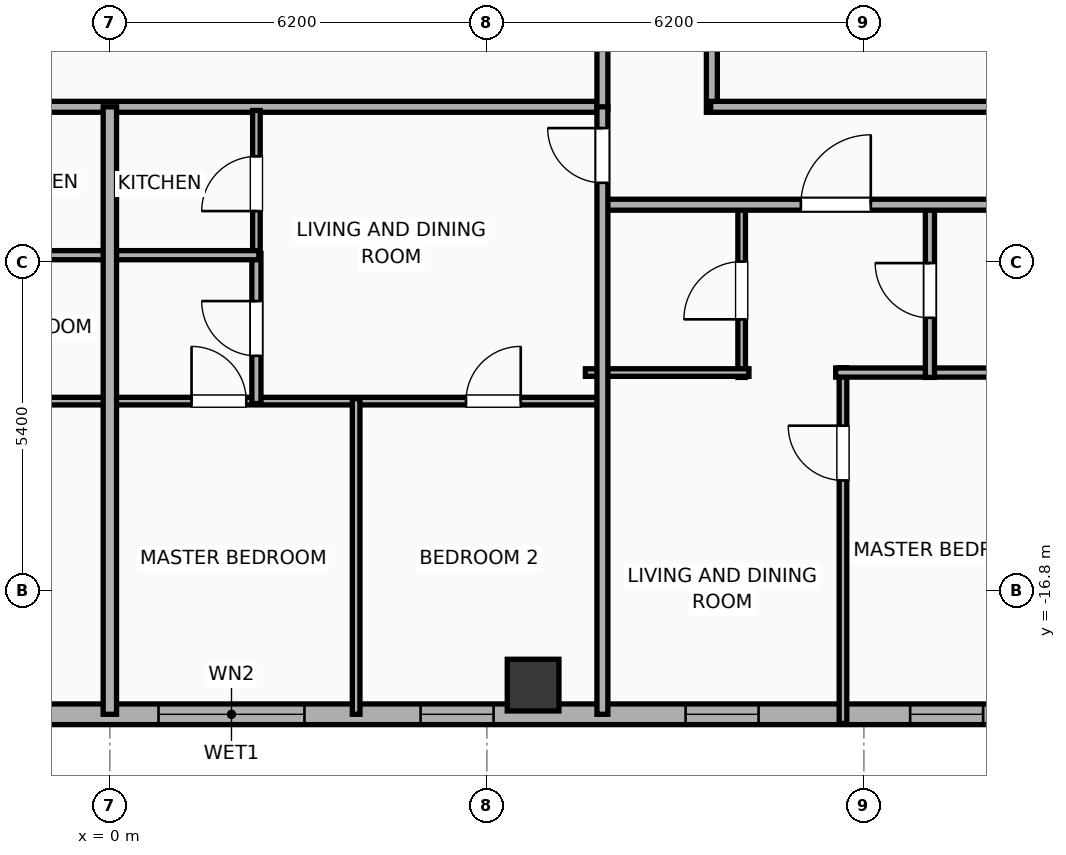
"""IFC4 building model, lengths in metres.
Left out: names, types, materials, properties, quantities, classifications, styles, units other than length and angle.
Written with IfcOpenShell. Run it as: python <this file> out.ifc"""

import sys

from ifc_helpers import new_model, si_unit, direction, frame, frame_2d, origin, origin_2d, place, context, subcontext, project, spatial, rectangle, hollow_rectangle, extrude, element, fill, save


model = new_model("IFC4")
c1 = context("Model", 3, precision=1e-05, world=origin(), true_north=direction((0.0, 1.0)))
c2 = subcontext(c1, "Body", "Model", "MODEL_VIEW")
j1 = project(units=[si_unit("LENGTHUNIT", "METRE"), si_unit("PLANEANGLEUNIT", "RADIAN")], contexts=[c1])
p1 = place(None, origin())
s1 = spatial("IfcSite", under=j1, at=p1, CompositionType="ELEMENT")
p2 = place(p1, origin())
s2 = spatial("IfcBuilding", under=s1, at=p2, CompositionType="ELEMENT")
p3 = place(p2, frame((0.0, 0.0, 250.9)))
s3 = spatial("IfcBuildingStorey", under=s2, at=p3, CompositionType="ELEMENT", Elevation=250.9)
p4 = place(p3, frame((6.96, -18.35, 0.0), z_axis=(0.0, 0.0, 1.0), x_axis=(1.0, 0.0, 0.0)))
e1 = element("IfcColumn", 1, at=p4, inside=s3, PredefinedType="COLUMN", context=c2, shape_type="SweptSolid", body=[
    extrude(hollow_rectangle(XDim=0.85, YDim=0.85, WallThickness=0.028, at=origin_2d()), origin(), (0.0, 0.0, 1.0), 3.865),
])
p5 = place(p3, frame((26.783, -18.83, 0.0), z_axis=(0.0, 0.0, 1.0), x_axis=(-1.0, 0.0, 0.0)))
e2 = element("IfcWall", 2, at=p5, inside=s3, PredefinedType="ELEMENTEDWALL", context=c2, shape_type="SweptSolid", body=[
    extrude(rectangle(XDim=49.566, YDim=0.34, at=frame_2d((24.783, 0.0))), origin(), (0.0, 0.0, 1.0), 2.39),
])
p6 = place(p5, frame((23.583, 0.0, 0.75)))
e3 = element("IfcOpeningElement", 3, at=p6, cuts=e2, PredefinedType="OPENING", context=c2, shape_type="SweptSolid", body=[
    extrude(rectangle(XDim=2.4, YDim=1.45, at=frame_2d((1.2, 0.725))), frame((0.0, 0.18, 0.0), z_axis=(0.0, -1.0, 0.0), x_axis=(1.0, 0.0, 0.0)), (0.0, 0.0, 1.0), 0.36),
])
p7 = place(p5, frame((41.756, 0.0, 0.75)))
e4 = element("IfcOpeningElement", 4, at=p7, cuts=e2, PredefinedType="OPENING", context=c2, shape_type="SweptSolid", body=[
    extrude(rectangle(XDim=2.4, YDim=1.45, at=frame_2d((1.2, 0.725))), frame((0.0, 0.18, 0.0), z_axis=(0.0, -1.0, 0.0), x_axis=(1.0, 0.0, 0.0)), (0.0, 0.0, 1.0), 0.36),
])
p8 = place(p5, frame((47.222, 0.0, 0.55)))
e5 = element("IfcOpeningElement", 5, at=p8, cuts=e2, PredefinedType="OPENING", context=c2, shape_type="SweptSolid", body=[
    extrude(rectangle(XDim=1.2, YDim=1.15, at=frame_2d((0.6, 0.575))), frame((0.0, 0.18, 0.0), z_axis=(0.0, -1.0, 0.0), x_axis=(1.0, 0.0, 0.0)), (0.0, 0.0, 1.0), 0.36),
])
p9 = place(p5, frame((45.181, 0.0, 0.55)))
e6 = element("IfcOpeningElement", 6, at=p9, cuts=e2, PredefinedType="OPENING", context=c2, shape_type="SweptSolid", body=[
    extrude(rectangle(XDim=1.2, YDim=1.15, at=frame_2d((0.6, 0.575))), frame((0.0, 0.18, 0.0), z_axis=(0.0, -1.0, 0.0), x_axis=(1.0, 0.0, 0.0)), (0.0, 0.0, 1.0), 0.36),
])
p10 = place(p5, frame((37.289, 0.0, 0.55)))
e7 = element("IfcOpeningElement", 7, at=p10, cuts=e2, PredefinedType="OPENING", context=c2, shape_type="SweptSolid", body=[
    extrude(rectangle(XDim=1.2, YDim=1.15, at=frame_2d((0.6, 0.575))), frame((0.0, 0.18, 0.0), z_axis=(0.0, -1.0, 0.0), x_axis=(1.0, 0.0, 0.0)), (0.0, 0.0, 1.0), 0.36),
])
p11 = place(p5, frame((16.115, 0.0, 0.55)))
e8 = element("IfcOpeningElement", 8, at=p11, cuts=e2, PredefinedType="OPENING", context=c2, shape_type="SweptSolid", body=[
    extrude(rectangle(XDim=1.2, YDim=1.15, at=frame_2d((0.6, 0.575))), frame((0.0, 0.18, 0.0), z_axis=(0.0, -1.0, 0.0), x_axis=(1.0, 0.0, 0.0)), (0.0, 0.0, 1.0), 0.36),
])
p12 = place(p5, frame((12.422, 0.0, 0.55)))
e9 = element("IfcOpeningElement", 9, at=p12, cuts=e2, PredefinedType="OPENING", context=c2, shape_type="SweptSolid", body=[
    extrude(rectangle(XDim=1.2, YDim=1.15, at=frame_2d((0.6, 0.575))), frame((0.0, 0.18, 0.0), z_axis=(0.0, -1.0, 0.0), x_axis=(1.0, 0.0, 0.0)), (0.0, 0.0, 1.0), 0.36),
])
p13 = place(p5, frame((6.705, 0.0, 0.55)))
e10 = element("IfcOpeningElement", 10, at=p13, cuts=e2, PredefinedType="OPENING", context=c2, shape_type="SweptSolid", body=[
    extrude(rectangle(XDim=0.85, YDim=1.15, at=frame_2d((0.425, 0.575))), frame((0.0, 0.18, 0.0), z_axis=(0.0, -1.0, 0.0), x_axis=(1.0, 0.0, 0.0)), (0.0, 0.0, 1.0), 0.36),
])
p14 = place(p5, frame((4.637, 0.0, 0.55)))
e11 = element("IfcOpeningElement", 11, at=p14, cuts=e2, PredefinedType="OPENING", context=c2, shape_type="SweptSolid", body=[
    extrude(rectangle(XDim=1.2, YDim=1.15, at=frame_2d((0.6, 0.575))), frame((0.0, 0.18, 0.0), z_axis=(0.0, -1.0, 0.0), x_axis=(1.0, 0.0, 0.0)), (0.0, 0.0, 1.0), 0.36),
])
p15 = place(p5, frame((1.811, 0.0, 0.55)))
e12 = element("IfcOpeningElement", 12, at=p15, cuts=e2, PredefinedType="OPENING", context=c2, shape_type="SweptSolid", body=[
    extrude(rectangle(XDim=1.2, YDim=1.15, at=frame_2d((0.6, 0.575))), frame((0.0, 0.18, 0.0), z_axis=(0.0, -1.0, 0.0), x_axis=(1.0, 0.0, 0.0)), (0.0, 0.0, 1.0), 0.36),
])
p16 = place(p5, frame((32.253, 0.0, 0.55)))
e13 = element("IfcOpeningElement", 13, at=p16, cuts=e2, PredefinedType="OPENING", context=c2, shape_type="SweptSolid", body=[
    extrude(rectangle(XDim=1.2, YDim=1.15, at=frame_2d((0.6, 0.575))), frame((0.0, 0.18, 0.0), z_axis=(0.0, -1.0, 0.0), x_axis=(1.0, 0.0, 0.0)), (0.0, 0.0, 1.0), 0.36),
])
p17 = place(p5, frame((27.853, 0.0, 0.55)))
e14 = element("IfcOpeningElement", 14, at=p17, cuts=e2, PredefinedType="OPENING", context=c2, shape_type="SweptSolid", body=[
    extrude(rectangle(XDim=1.2, YDim=1.15, at=frame_2d((0.6, 0.575))), frame((0.0, 0.18, 0.0), z_axis=(0.0, -1.0, 0.0), x_axis=(1.0, 0.0, 0.0)), (0.0, 0.0, 1.0), 0.36),
])
p18 = place(p5, frame((20.473, 0.0, 0.55)))
e15 = element("IfcOpeningElement", 15, at=p18, cuts=e2, PredefinedType="OPENING", context=c2, shape_type="SweptSolid", body=[
    extrude(rectangle(XDim=1.2, YDim=1.15, at=frame_2d((0.6, 0.575))), frame((0.0, 0.18, 0.0), z_axis=(0.0, -1.0, 0.0), x_axis=(1.0, 0.0, 0.0)), (0.0, 0.0, 1.0), 0.36),
])
p19 = place(p3, frame((9.9, -8.93, 0.0), z_axis=(0.0, 0.0, 1.0), x_axis=(0.0, 1.0, 0.0)))
e16 = element("IfcWall", 16, at=p19, inside=s3, PredefinedType="PARTITIONING", context=c2, shape_type="SweptSolid", body=[
    extrude(rectangle(XDim=17.86, YDim=0.18, at=frame_2d((8.93, 0.0))), origin(), (0.0, 0.0, 1.0), 3.5),
])
p20 = place(p19, frame((7.487, 0.0, 0.0)))
e17 = element("IfcOpeningElement", 17, at=p20, cuts=e16, PredefinedType="OPENING", context=c2, shape_type="SweptSolid", body=[
    extrude(rectangle(XDim=1.1, YDim=2.05, at=frame_2d((0.55, 1.025))), frame((0.0, 0.1, 0.0), z_axis=(0.0, -1.0, 0.0), x_axis=(1.0, 0.0, 0.0)), (0.0, 0.0, 1.0), 0.2),
])
p21 = place(p3, frame((9.88, -8.84, 0.0), z_axis=(0.0, 0.0, 1.0), x_axis=(1.0, 0.0, 0.0)))
e18 = element("IfcWall", 18, at=p21, inside=s3, PredefinedType="PARTITIONING", context=c2, shape_type="SweptSolid", body=[
    extrude(rectangle(XDim=20.35, YDim=0.18, at=frame_2d((10.175, 0.0))), origin(), (0.0, 0.0, 1.0), 3.5),
])
p22 = place(p3, frame((-8.15, -8.84, 0.0), z_axis=(0.0, 0.0, 1.0), x_axis=(1.0, 0.0, 0.0)))
e19 = element("IfcWall", 19, at=p22, inside=s3, PredefinedType="PARTITIONING", context=c2, shape_type="SweptSolid", body=[
    extrude(rectangle(XDim=16.3, YDim=0.18, at=frame_2d((8.15, 0.0))), origin(), (0.0, 0.0, 1.0), 3.5),
])
p23 = place(p3, frame((8.1, -8.88, 0.0), z_axis=(0.0, 0.0, 1.0), x_axis=(0.0, 1.0, 0.0)))
e20 = element("IfcWall", 20, at=p23, inside=s3, PredefinedType="PARTITIONING", context=c2, shape_type="SweptSolid", body=[
    extrude(rectangle(XDim=17.76, YDim=0.18, at=frame_2d((8.88, 0.0))), origin(), (0.0, 0.0, 1.0), 3.5),
])
p24 = place(p3, frame((12.056, -18.98, 0.0), z_axis=(0.0, 0.0, 1.0), x_axis=(0.0, 1.0, 0.0)))
e21 = element("IfcWall", 21, at=p24, inside=s3, PredefinedType="PARTITIONING", context=c2, shape_type="SweptSolid", body=[
    extrude(rectangle(XDim=5.85, YDim=0.125, at=frame_2d((2.925, 0.0))), origin(), (0.0, 0.0, 1.0), 3.5),
])
p25 = place(p24, frame((3.996, 0.0, 0.0)))
e22 = element("IfcOpeningElement", 22, at=p25, cuts=e21, PredefinedType="OPENING", context=c2, shape_type="SweptSolid", body=[
    extrude(rectangle(XDim=0.9, YDim=2.05, at=frame_2d((0.45, 1.025))), frame((0.0, 0.073, 0.0), z_axis=(0.0, -1.0, 0.0), x_axis=(1.0, 0.0, 0.0)), (0.0, 0.0, 1.0), 0.145),
])
p26 = place(p3, frame((11.936, -13.21, 0.0), z_axis=(0.0, 0.0, 1.0), x_axis=(1.0, 0.0, 0.0)))
e23 = element("IfcWall", 23, at=p26, inside=s3, PredefinedType="PLUMBINGWALL", context=c2, shape_type="SweptSolid", body=[
    extrude(rectangle(XDim=3.79, YDim=0.15, at=frame_2d((1.895, 0.0))), origin(), (0.0, 0.0, 1.0), 3.5),
])
p27 = place(p3, frame((10.39, -13.29, 0.0), z_axis=(0.0, 0.0, 1.0), x_axis=(0.0, 1.0, 0.0)))
e24 = element("IfcWall", 24, at=p27, inside=s3, PredefinedType="PARTITIONING", context=c2, shape_type="SweptSolid", body=[
    extrude(rectangle(XDim=2.86, YDim=0.125, at=frame_2d((1.43, 0.0))), origin(), (0.0, 0.0, 1.0), 3.5),
])
p28 = place(p27, frame((0.955, 0.0, 0.0)))
e25 = element("IfcOpeningElement", 25, at=p28, cuts=e24, PredefinedType="OPENING", context=c2, shape_type="SweptSolid", body=[
    extrude(rectangle(XDim=0.95, YDim=2.05, at=frame_2d((0.475, 1.025))), frame((0.0, 0.073, 0.0), z_axis=(0.0, -1.0, 0.0), x_axis=(1.0, 0.0, 0.0)), (0.0, 0.0, 1.0), 0.145),
])
p29 = place(p3, frame((7.82, -13.21, 0.0), z_axis=(0.0, 0.0, 1.0), x_axis=(1.0, 0.0, 0.0)))
e26 = element("IfcWall", 26, at=p29, inside=s3, PredefinedType="PARTITIONING", context=c2, shape_type="SweptSolid", body=[
    extrude(rectangle(XDim=2.69, YDim=0.125, at=frame_2d((1.345, 0.0))), origin(), (0.0, 0.0, 1.0), 3.5),
])
p30 = place(p3, frame((13.486, -13.29, 0.0), z_axis=(0.0, 0.0, 1.0), x_axis=(0.0, 1.0, 0.0)))
e27 = element("IfcWall", 27, at=p30, inside=s3, PredefinedType="PLUMBINGWALL", context=c2, shape_type="SweptSolid", body=[
    extrude(rectangle(XDim=2.86, YDim=0.15, at=frame_2d((1.43, 0.0))), origin(), (0.0, 0.0, 1.0), 3.5),
])
p31 = place(p30, frame((0.98, 0.0, 0.0)))
e28 = element("IfcOpeningElement", 28, at=p31, cuts=e27, PredefinedType="OPENING", context=c2, shape_type="SweptSolid", body=[
    extrude(rectangle(XDim=0.9, YDim=2.05, at=frame_2d((0.45, 1.025))), frame((0.0, 0.085, 0.0), z_axis=(0.0, -1.0, 0.0), x_axis=(1.0, 0.0, 0.0)), (0.0, 0.0, 1.0), 0.17),
])
p32 = place(p3, frame((8.08, -10.45, 0.0), z_axis=(0.0, 0.0, 1.0), x_axis=(1.0, 0.0, 0.0)))
e29 = element("IfcWall", 29, at=p32, inside=s3, PredefinedType="PARTITIONING", context=c2, shape_type="SweptSolid", body=[
    extrude(rectangle(XDim=22.15, YDim=0.18, at=frame_2d((11.075, 0.0))), origin(), (0.0, 0.0, 1.0), 3.5),
])
p33 = place(p32, frame((3.283, 0.0, 0.0)))
e30 = element("IfcOpeningElement", 30, at=p33, cuts=e29, PredefinedType="OPENING", context=c2, shape_type="SweptSolid", body=[
    extrude(rectangle(XDim=1.15, YDim=2.05, at=frame_2d((0.575, 1.025))), frame((0.0, 0.1, 0.0), z_axis=(0.0, -1.0, 0.0), x_axis=(1.0, 0.0, 0.0)), (0.0, 0.0, 1.0), 0.2),
])
p34 = place(p32, frame((9.229, 0.0, 0.0)))
e31 = element("IfcOpeningElement", 31, at=p34, cuts=e29, PredefinedType="OPENING", context=c2, shape_type="SweptSolid", body=[
    extrude(rectangle(XDim=1.15, YDim=2.05, at=frame_2d((0.575, 1.025))), frame((0.0, 0.1, 0.0), z_axis=(0.0, -1.0, 0.0), x_axis=(1.0, 0.0, 0.0)), (0.0, 0.0, 1.0), 0.2),
])
p35 = place(p32, frame((18.084, 0.0, 0.0)))
e32 = element("IfcOpeningElement", 32, at=p35, cuts=e29, PredefinedType="OPENING", context=c2, shape_type="SweptSolid", body=[
    extrude(rectangle(XDim=1.15, YDim=2.05, at=frame_2d((0.575, 1.025))), frame((0.0, 0.1, 0.0), z_axis=(0.0, -1.0, 0.0), x_axis=(1.0, 0.0, 0.0)), (0.0, 0.0, 1.0), 0.2),
])
p36 = place(p3, frame((-8.08, -13.68, 0.0), z_axis=(0.0, 0.0, 1.0), x_axis=(1.0, 0.0, 0.0)))
e33 = element("IfcWall", 33, at=p36, inside=s3, PredefinedType="PARTITIONING", context=c2, shape_type="SweptSolid", body=[
    extrude(rectangle(XDim=8.06, YDim=0.125, at=frame_2d((4.03, 0.0))), origin(), (0.0, 0.0, 1.0), 3.5),
])
p37 = place(p36, frame((1.323, 0.0, 0.0)))
e34 = element("IfcOpeningElement", 34, at=p37, cuts=e33, PredefinedType="OPENING", context=c2, shape_type="SweptSolid", body=[
    extrude(rectangle(XDim=0.9, YDim=2.05, at=frame_2d((0.45, 1.025))), frame((0.0, 0.073, 0.0), z_axis=(0.0, -1.0, 0.0), x_axis=(1.0, 0.0, 0.0)), (0.0, 0.0, 1.0), 0.145),
])
p38 = place(p36, frame((4.547, 0.0, 0.0)))
e35 = element("IfcOpeningElement", 35, at=p38, cuts=e33, PredefinedType="OPENING", context=c2, shape_type="SweptSolid", body=[
    extrude(rectangle(XDim=0.9, YDim=2.05, at=frame_2d((0.45, 1.025))), frame((0.0, 0.073, 0.0), z_axis=(0.0, -1.0, 0.0), x_axis=(1.0, 0.0, 0.0)), (0.0, 0.0, 1.0), 0.145),
])
p39 = place(p3, frame((-2.45, -11.28, 0.0), z_axis=(0.0, 0.0, 1.0), x_axis=(1.0, 0.0, 0.0)))
e36 = element("IfcWall", 36, at=p39, inside=s3, PredefinedType="PLUMBINGWALL", context=c2, shape_type="SweptSolid", body=[
    extrude(rectangle(XDim=2.43, YDim=0.15, at=frame_2d((1.215, 0.0))), origin(), (0.0, 0.0, 1.0), 3.5),
])
p40 = place(p3, frame((0.02, -13.68, 0.0), z_axis=(0.0, 0.0, 1.0), x_axis=(1.0, 0.0, 0.0)))
e37 = element("IfcWall", 37, at=p40, inside=s3, PredefinedType="PARTITIONING", context=c2, shape_type="SweptSolid", body=[
    extrude(rectangle(XDim=8.06, YDim=0.125, at=frame_2d((4.03, 0.0))), origin(), (0.0, 0.0, 1.0), 3.5),
])
p41 = place(p40, frame((1.323, 0.0, 0.0)))
e38 = element("IfcOpeningElement", 38, at=p41, cuts=e37, PredefinedType="OPENING", context=c2, shape_type="SweptSolid", body=[
    extrude(rectangle(XDim=0.9, YDim=2.05, at=frame_2d((0.45, 1.025))), frame((0.0, 0.073, 0.0), z_axis=(0.0, -1.0, 0.0), x_axis=(1.0, 0.0, 0.0)), (0.0, 0.0, 1.0), 0.145),
])
p42 = place(p40, frame((5.837, 0.0, 0.0)))
e39 = element("IfcOpeningElement", 39, at=p42, cuts=e37, PredefinedType="OPENING", context=c2, shape_type="SweptSolid", body=[
    extrude(rectangle(XDim=0.9, YDim=2.05, at=frame_2d((0.45, 1.025))), frame((0.0, 0.073, 0.0), z_axis=(0.0, -1.0, 0.0), x_axis=(1.0, 0.0, 0.0)), (0.0, 0.0, 1.0), 0.145),
])
p43 = place(p3, frame((2.41, -11.31, 0.0), z_axis=(0.0, 0.0, 1.0), x_axis=(0.0, 1.0, 0.0)))
e40 = element("IfcWall", 40, at=p43, inside=s3, PredefinedType="PARTITIONING", context=c2, shape_type="SweptSolid", body=[
    extrude(rectangle(XDim=2.41, YDim=0.125, at=frame_2d((1.205, 0.0))), origin(), (0.0, 0.0, 1.0), 2.39),
])
p44 = place(p43, frame((0.755, 0.0, 0.0)))
e41 = element("IfcOpeningElement", 41, at=p44, cuts=e40, PredefinedType="OPENING", context=c2, shape_type="SweptSolid", body=[
    extrude(rectangle(XDim=0.9, YDim=2.05, at=frame_2d((0.45, 1.025))), frame((0.0, 0.073, 0.0), z_axis=(0.0, -1.0, 0.0), x_axis=(1.0, 0.0, 0.0)), (0.0, 0.0, 1.0), 0.145),
])
p45 = place(p3, frame((2.41, -13.72, 0.0), z_axis=(0.0, 0.0, 1.0), x_axis=(0.0, 1.0, 0.0)))
e42 = element("IfcWall", 42, at=p45, inside=s3, PredefinedType="PLUMBINGWALL", context=c2, shape_type="SweptSolid", body=[
    extrude(rectangle(XDim=2.47, YDim=0.15, at=frame_2d((1.235, 0.0))), origin(), (0.0, 0.0, 1.0), 2.39),
])
p46 = place(p45, frame((0.785, 0.0, 0.0)))
e43 = element("IfcOpeningElement", 43, at=p46, cuts=e42, PredefinedType="OPENING", context=c2, shape_type="SweptSolid", body=[
    extrude(rectangle(XDim=0.9, YDim=2.05, at=frame_2d((0.45, 1.025))), frame((0.0, 0.085, 0.0), z_axis=(0.0, -1.0, 0.0), x_axis=(1.0, 0.0, 0.0)), (0.0, 0.0, 1.0), 0.17),
])
p47 = place(p3, frame((0.02, -11.28, 0.0), z_axis=(0.0, 0.0, 1.0), x_axis=(1.0, 0.0, 0.0)))
e44 = element("IfcWall", 44, at=p47, inside=s3, PredefinedType="PLUMBINGWALL", context=c2, shape_type="SweptSolid", body=[
    extrude(rectangle(XDim=2.43, YDim=0.15, at=frame_2d((1.215, 0.0))), origin(), (0.0, 0.0, 1.0), 3.5),
])
p48 = place(p3, frame((4.05, -18.83, 0.0), z_axis=(0.0, 0.0, 1.0), x_axis=(0.0, 1.0, 0.0)))
e45 = element("IfcWall", 45, at=p48, inside=s3, PredefinedType="PARTITIONING", context=c2, shape_type="SweptSolid", body=[
    extrude(rectangle(XDim=5.19, YDim=0.125, at=frame_2d((2.595, 0.0))), origin(), (0.0, 0.0, 1.0), 3.5),
])
p49 = place(p3, frame((8.1, -18.83, 0.0), z_axis=(0.0, 0.0, 1.0), x_axis=(0.0, 1.0, 0.0)))
e46 = element("IfcWall", 46, at=p49, inside=s3, PredefinedType="PARTITIONING", context=c2, shape_type="SweptSolid", body=[
    extrude(rectangle(XDim=9.99, YDim=0.18, at=frame_2d((4.995, 0.0))), origin(), (0.0, 0.0, 1.0), 3.5),
])
p50 = place(p49, frame((8.74, 0.0, 0.0)))
e47 = element("IfcOpeningElement", 47, at=p50, cuts=e46, PredefinedType="OPENING", context=c2, shape_type="SweptSolid", body=[
    extrude(rectangle(XDim=0.9, YDim=2.05, at=frame_2d((0.45, 1.025))), frame((0.0, 0.1, 0.0), z_axis=(0.0, -1.0, 0.0), x_axis=(1.0, 0.0, 0.0)), (0.0, 0.0, 1.0), 0.2),
])
p51 = place(p3, frame((0.0, -18.83, 0.0), z_axis=(0.0, 0.0, 1.0), x_axis=(0.0, 1.0, 0.0)))
e48 = element("IfcWall", 48, at=p51, inside=s3, PredefinedType="PARTITIONING", context=c2, shape_type="SweptSolid", body=[
    extrude(rectangle(XDim=9.99, YDim=0.22, at=frame_2d((4.995, 0.0))), origin(), (0.0, 0.0, 1.0), 2.39),
])
p52 = place(p6, origin())
e49 = element("IfcWindow", 49, at=p52, inside=s3, PartitioningType="SINGLE_PANEL", PredefinedType="WINDOW", context=c2, shape_type="SweptSolid", body=[
    extrude(rectangle(XDim=2.4, YDim=1.45, at=frame_2d((1.2, 0.725))), frame((0.0, 0.03, 0.0), z_axis=(0.0, -1.0, 0.0), x_axis=(1.0, 0.0, 0.0)), (0.0, 0.0, 1.0), 0.06),
])
fill(e3, e49)
p53 = place(p11, origin())
e50 = element("IfcWindow", 50, at=p53, inside=s3, PartitioningType="SINGLE_PANEL", PredefinedType="WINDOW", context=c2, shape_type="SweptSolid", body=[
    extrude(rectangle(XDim=1.2, YDim=1.15, at=frame_2d((0.6, 0.575))), frame((0.0, 0.03, 0.0), z_axis=(0.0, -1.0, 0.0), x_axis=(1.0, 0.0, 0.0)), (0.0, 0.0, 1.0), 0.06),
])
fill(e8, e50)
p54 = place(p12, origin())
e51 = element("IfcWindow", 51, at=p54, inside=s3, PartitioningType="SINGLE_PANEL", PredefinedType="WINDOW", context=c2, shape_type="SweptSolid", body=[
    extrude(rectangle(XDim=1.2, YDim=1.15, at=frame_2d((0.6, 0.575))), frame((0.0, 0.03, 0.0), z_axis=(0.0, -1.0, 0.0), x_axis=(1.0, 0.0, 0.0)), (0.0, 0.0, 1.0), 0.06),
])
fill(e9, e51)
p55 = place(p18, origin())
e52 = element("IfcWindow", 52, at=p55, inside=s3, PartitioningType="SINGLE_PANEL", PredefinedType="WINDOW", context=c2, shape_type="SweptSolid", body=[
    extrude(rectangle(XDim=1.2, YDim=1.15, at=frame_2d((0.6, 0.575))), frame((0.0, 0.03, 0.0), z_axis=(0.0, -1.0, 0.0), x_axis=(1.0, 0.0, 0.0)), (0.0, 0.0, 1.0), 0.06),
])
fill(e15, e52)
p56 = place(p25, origin())
e53 = element("IfcDoor", 53, at=p56, inside=s3, OperationType="SINGLE_SWING_RIGHT", PredefinedType="DOOR", context=c2, shape_type="SweptSolid", body=[
    extrude(rectangle(XDim=0.9, YDim=2.05, at=frame_2d((0.45, 1.025))), frame((0.0, 0.025, 0.0), z_axis=(0.0, -1.0, 0.0), x_axis=(1.0, 0.0, 0.0)), (0.0, 0.0, 1.0), 0.05),
])
fill(e22, e53)
p57 = place(p28, origin())
e54 = element("IfcDoor", 54, at=p57, inside=s3, OperationType="SINGLE_SWING_LEFT", PredefinedType="DOOR", context=c2, shape_type="SweptSolid", body=[
    extrude(rectangle(XDim=0.95, YDim=2.05, at=frame_2d((0.475, 1.025))), frame((0.0, 0.025, 0.0), z_axis=(0.0, -1.0, 0.0), x_axis=(1.0, 0.0, 0.0)), (0.0, 0.0, 1.0), 0.05),
])
fill(e25, e54)
p58 = place(p31, origin())
e55 = element("IfcDoor", 55, at=p58, inside=s3, OperationType="SINGLE_SWING_RIGHT", PredefinedType="DOOR", context=c2, shape_type="SweptSolid", body=[
    extrude(rectangle(XDim=0.9, YDim=2.05, at=frame_2d((0.45, 1.025))), frame((0.0, 0.025, 0.0), z_axis=(0.0, -1.0, 0.0), x_axis=(1.0, 0.0, 0.0)), (0.0, 0.0, 1.0), 0.05),
])
fill(e28, e55)
p59 = place(p33, origin())
e56 = element("IfcDoor", 56, at=p59, inside=s3, OperationType="SINGLE_SWING_RIGHT", PredefinedType="DOOR", context=c2, shape_type="SweptSolid", body=[
    extrude(rectangle(XDim=1.15, YDim=2.05, at=frame_2d((0.575, 1.025))), frame((0.0, 0.025, 0.0), z_axis=(0.0, -1.0, 0.0), x_axis=(1.0, 0.0, 0.0)), (0.0, 0.0, 1.0), 0.05),
])
fill(e30, e56)
p60 = place(p41, origin())
e57 = element("IfcDoor", 57, at=p60, inside=s3, OperationType="SINGLE_SWING_LEFT", PredefinedType="DOOR", context=c2, shape_type="SweptSolid", body=[
    extrude(rectangle(XDim=0.9, YDim=2.05, at=frame_2d((0.45, 1.025))), frame((0.0, 0.025, 0.0), z_axis=(0.0, -1.0, 0.0), x_axis=(1.0, 0.0, 0.0)), (0.0, 0.0, 1.0), 0.05),
])
fill(e38, e57)
p61 = place(p42, origin())
e58 = element("IfcDoor", 58, at=p61, inside=s3, OperationType="SINGLE_SWING_RIGHT", PredefinedType="DOOR", context=c2, shape_type="SweptSolid", body=[
    extrude(rectangle(XDim=0.9, YDim=2.05, at=frame_2d((0.45, 1.025))), frame((0.0, 0.025, 0.0), z_axis=(0.0, -1.0, 0.0), x_axis=(1.0, 0.0, 0.0)), (0.0, 0.0, 1.0), 0.05),
])
fill(e39, e58)
p62 = place(p44, origin())
e59 = element("IfcDoor", 59, at=p62, inside=s3, OperationType="SINGLE_SWING_LEFT", PredefinedType="DOOR", context=c2, shape_type="SweptSolid", body=[
    extrude(rectangle(XDim=0.9, YDim=2.05, at=frame_2d((0.45, 1.025))), frame((0.0, 0.025, 0.0), z_axis=(0.0, -1.0, 0.0), x_axis=(1.0, 0.0, 0.0)), (0.0, 0.0, 1.0), 0.05),
])
fill(e41, e59)
p63 = place(p46, origin())
e60 = element("IfcDoor", 60, at=p63, inside=s3, OperationType="SINGLE_SWING_RIGHT", PredefinedType="DOOR", context=c2, shape_type="SweptSolid", body=[
    extrude(rectangle(XDim=0.9, YDim=2.05, at=frame_2d((0.45, 1.025))), frame((0.0, 0.025, 0.0), z_axis=(0.0, -1.0, 0.0), x_axis=(1.0, 0.0, 0.0)), (0.0, 0.0, 1.0), 0.05),
])
fill(e43, e60)
p64 = place(p50, origin())
e61 = element("IfcDoor", 61, at=p64, inside=s3, OperationType="SINGLE_SWING_RIGHT", PredefinedType="DOOR", context=c2, shape_type="SweptSolid", body=[
    extrude(rectangle(XDim=0.9, YDim=2.05, at=frame_2d((0.45, 1.025))), frame((0.0, 0.025, 0.0), z_axis=(0.0, -1.0, 0.0), x_axis=(1.0, 0.0, 0.0)), (0.0, 0.0, 1.0), 0.05),
])
fill(e47, e61)
save(model, sys.argv[1])
